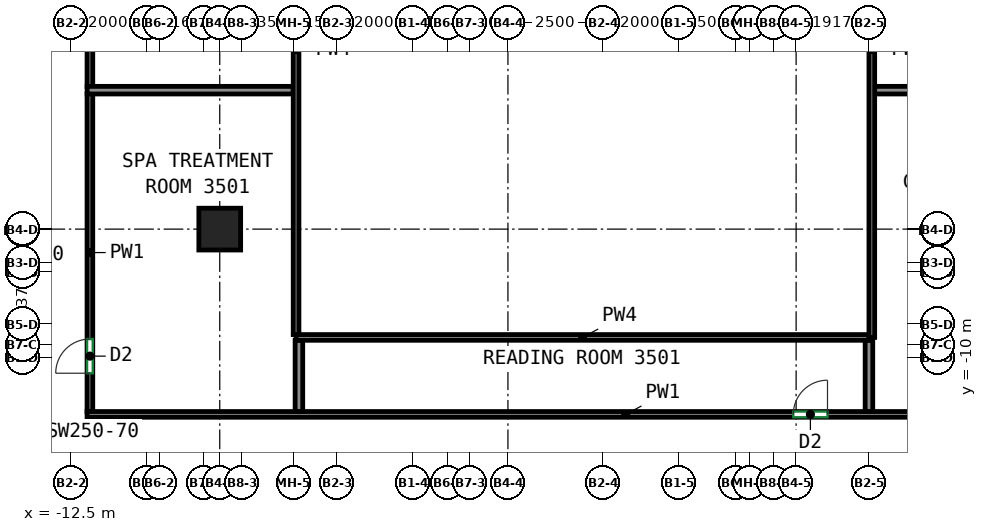
"""IFC4 building model, lengths in metres.
Left out: names, types, materials, properties, quantities, classifications, styles, units other than length and angle.
Written with IfcOpenShell. Run it as: python <this file> out.ifc"""

import sys

from ifc_helpers import new_model, si_unit, direction, frame, frame_2d, origin, origin_2d, place, context, subcontext, project, spatial, rectangle, extrude, source, transform, mapped, element, fill, save


model = new_model("IFC4")
c1 = context("Model", 3, precision=1e-05, world=origin(), true_north=direction((0.0, 1.0)))
c2 = subcontext(c1, "Body", "Model", "MODEL_VIEW")
j1 = project(units=[si_unit("LENGTHUNIT", "METRE"), si_unit("PLANEANGLEUNIT", "RADIAN")], contexts=[c1])
p1 = place(None, origin())
s1 = spatial("IfcSite", under=j1, at=p1, CompositionType="ELEMENT")
p2 = place(p1, origin())
s2 = spatial("IfcBuilding", under=s1, at=p2, CompositionType="ELEMENT")
p3 = place(p2, frame((0.0, 0.0, 154.1)))
s3 = spatial("IfcBuildingStorey", under=s2, at=p3, CompositionType="ELEMENT", Elevation=154.1)
m1 = source(origin(), c2, "Body", "SweptSolid", [
    extrude(rectangle(XDim=1.1, YDim=1.1, at=origin_2d()), origin(), (0.0, 0.0, 1.0), 3.12),
])
p4 = place(p3, frame((-8.583, -6.625, 0.0), z_axis=(0.0, 0.0, 1.0), x_axis=(1.0, 0.0, 0.0)))
e1 = element("IfcColumn", 1, at=p4, inside=s3, PredefinedType="COLUMN", context=c2, shape_type="MappedRepresentation", body=[
    mapped(m1, transform((0.0, 0.0, 0.0))),
])
p5 = place(p3, frame((-12.0, -11.425, 0.0), z_axis=(0.0, 0.0, 1.0), x_axis=(0.0, 1.0, 0.0)))
e2 = element("IfcWall", 2, at=p5, inside=s3, PredefinedType="PARTITIONING", context=c2, shape_type="SweptSolid", body=[
    extrude(rectangle(XDim=8.366, YDim=0.15, at=frame_2d((4.183, 0.0))), origin(), (0.0, 0.0, 1.0), 3.12),
])
p6 = place(p5, frame((1.008, 0.0, 0.0)))
e3 = element("IfcOpeningElement", 3, at=p6, cuts=e2, PredefinedType="OPENING", context=c2, shape_type="SweptSolid", body=[
    extrude(rectangle(XDim=0.9, YDim=2.1, at=frame_2d((0.45, 1.05))), frame((0.0, 0.085, 0.0), z_axis=(0.0, -1.0, 0.0), x_axis=(1.0, 0.0, 0.0)), (0.0, 0.0, 1.0), 0.17),
])
p7 = place(p3, frame((-12.075, -11.5, 0.0), z_axis=(0.0, 0.0, 1.0), x_axis=(1.0, 0.0, 0.0)))
e4 = element("IfcWall", 4, at=p7, inside=s3, PredefinedType="PARTITIONING", context=c2, shape_type="SweptSolid", body=[
    extrude(rectangle(XDim=28.35, YDim=0.15, at=frame_2d((14.175, 0.0))), origin(), (0.0, 0.0, 1.0), 3.12),
])
p8 = place(p7, frame((18.584, 0.0, 0.0)))
e5 = element("IfcOpeningElement", 5, at=p8, cuts=e4, PredefinedType="OPENING", context=c2, shape_type="SweptSolid", body=[
    extrude(rectangle(XDim=0.9, YDim=2.1, at=frame_2d((0.45, 1.05))), frame((0.0, 0.085, 0.0), z_axis=(0.0, -1.0, 0.0), x_axis=(1.0, 0.0, 0.0)), (0.0, 0.0, 1.0), 0.17),
])
p9 = place(p3, frame((-12.0, -2.879, 0.0), z_axis=(0.0, 0.0, 1.0), x_axis=(0.0, 1.0, 0.0)))
e6 = element("IfcWall", 6, at=p9, inside=s3, PredefinedType="PARTITIONING", context=c2, shape_type="SweptSolid", body=[
    extrude(rectangle(XDim=6.004, YDim=0.15, at=frame_2d((3.002, 0.0))), origin(), (0.0, 0.0, 1.0), 3.12),
])
p10 = place(p9, frame((1.701, 0.0, 0.0)))
e7 = element("IfcOpeningElement", 7, at=p10, cuts=e6, PredefinedType="OPENING", context=c2, shape_type="SweptSolid", body=[
    extrude(rectangle(XDim=0.9, YDim=2.1, at=frame_2d((0.45, 1.05))), frame((0.0, 0.085, 0.0), z_axis=(0.0, -1.0, 0.0), x_axis=(1.0, 0.0, 0.0)), (0.0, 0.0, 1.0), 0.17),
])
p11 = place(p3, frame((-12.073, -2.969, 0.0), z_axis=(0.0, 0.0, 1.0), x_axis=(1.0, 0.0, 0.0)))
e8 = element("IfcWall", 8, at=p11, inside=s3, PredefinedType="PARTITIONING", context=c2, shape_type="SweptSolid", body=[
    extrude(rectangle(XDim=5.423, YDim=0.2, at=frame_2d((2.711, 0.0))), origin(), (0.0, 0.0, 1.0), 3.12),
])
for number, where, z_axis, x_axis in (
    (9, (-6.5, -11.423, 0.0), (0.0, 0.0, 1.0), (0.0, 1.0, 0.0)),
    (10, (8.5, -11.423, 0.0), (0.0, 0.0, 1.0), (0.0, 1.0, 0.0)),
):
    element("IfcWall", number, at=place(p3, frame(where, z_axis=z_axis, x_axis=x_axis)), inside=s3, PredefinedType="PARTITIONING", context=c2, shape_type="SweptSolid", body=[
        extrude(rectangle(XDim=1.873, YDim=0.2, at=frame_2d((0.937, 0.0))), origin(), (0.0, 0.0, 1.0), 3.12),
    ])
p12 = place(p3, frame((8.65, -2.969, 0.0), z_axis=(0.0, 0.0, 1.0), x_axis=(1.0, 0.0, 0.0)))
e11 = element("IfcWall", 11, at=p12, inside=s3, PredefinedType="PARTITIONING", context=c2, shape_type="SweptSolid", body=[
    extrude(rectangle(XDim=7.623, YDim=0.2, at=frame_2d((3.812, 0.0))), origin(), (0.0, 0.0, 1.0), 3.12),
])
p13 = place(p3, frame((8.5, -9.475, 0.0), z_axis=(0.0, 0.0, 1.0), x_axis=(-1.0, 0.0, 0.0)))
e12 = element("IfcWall", 12, at=p13, inside=s3, PredefinedType="PARTITIONING", context=c2, shape_type="SweptSolid", body=[
    extrude(rectangle(XDim=15.075, YDim=0.15, at=frame_2d((7.538, 0.0))), origin(), (0.0, 0.0, 1.0), 3.12),
])
p14 = place(p3, frame((-6.575, -9.4, 0.0), z_axis=(0.0, 0.0, 1.0), x_axis=(0.0, 1.0, 0.0)))
e13 = element("IfcWall", 13, at=p14, inside=s3, PredefinedType="PARTITIONING", context=c2, shape_type="SweptSolid", body=[
    extrude(rectangle(XDim=15.0, YDim=0.15, at=frame_2d((7.5, 0.0))), origin(), (0.0, 0.0, 1.0), 3.12),
])
p15 = place(p3, frame((8.575, 5.675, 0.0), z_axis=(0.0, 0.0, 1.0), x_axis=(0.0, -1.0, 0.0)))
e14 = element("IfcWall", 14, at=p15, inside=s3, PredefinedType="PARTITIONING", context=c2, shape_type="SweptSolid", body=[
    extrude(rectangle(XDim=15.15, YDim=0.15, at=frame_2d((7.575, 0.0))), origin(), (0.0, 0.0, 1.0), 3.12),
])
p16 = place(p8, origin())
e15 = element("IfcDoor", 15, at=p16, inside=s3, OperationType="SINGLE_SWING_RIGHT", PredefinedType="DOOR", context=c2, shape_type="SweptSolid", body=[
    extrude(rectangle(XDim=0.9, YDim=2.1, at=frame_2d((0.45, 1.05))), frame((0.0, 0.025, 0.0), z_axis=(0.0, -1.0, 0.0), x_axis=(1.0, 0.0, 0.0)), (0.0, 0.0, 1.0), 0.05),
])
fill(e5, e15)
p17 = place(p6, origin())
e16 = element("IfcDoor", 16, at=p17, inside=s3, OperationType="SINGLE_SWING_LEFT", PredefinedType="DOOR", context=c2, shape_type="SweptSolid", body=[
    extrude(rectangle(XDim=0.9, YDim=2.1, at=frame_2d((0.45, 1.05))), frame((0.0, 0.025, 0.0), z_axis=(0.0, -1.0, 0.0), x_axis=(1.0, 0.0, 0.0)), (0.0, 0.0, 1.0), 0.05),
])
fill(e3, e16)
save(model, sys.argv[1])
